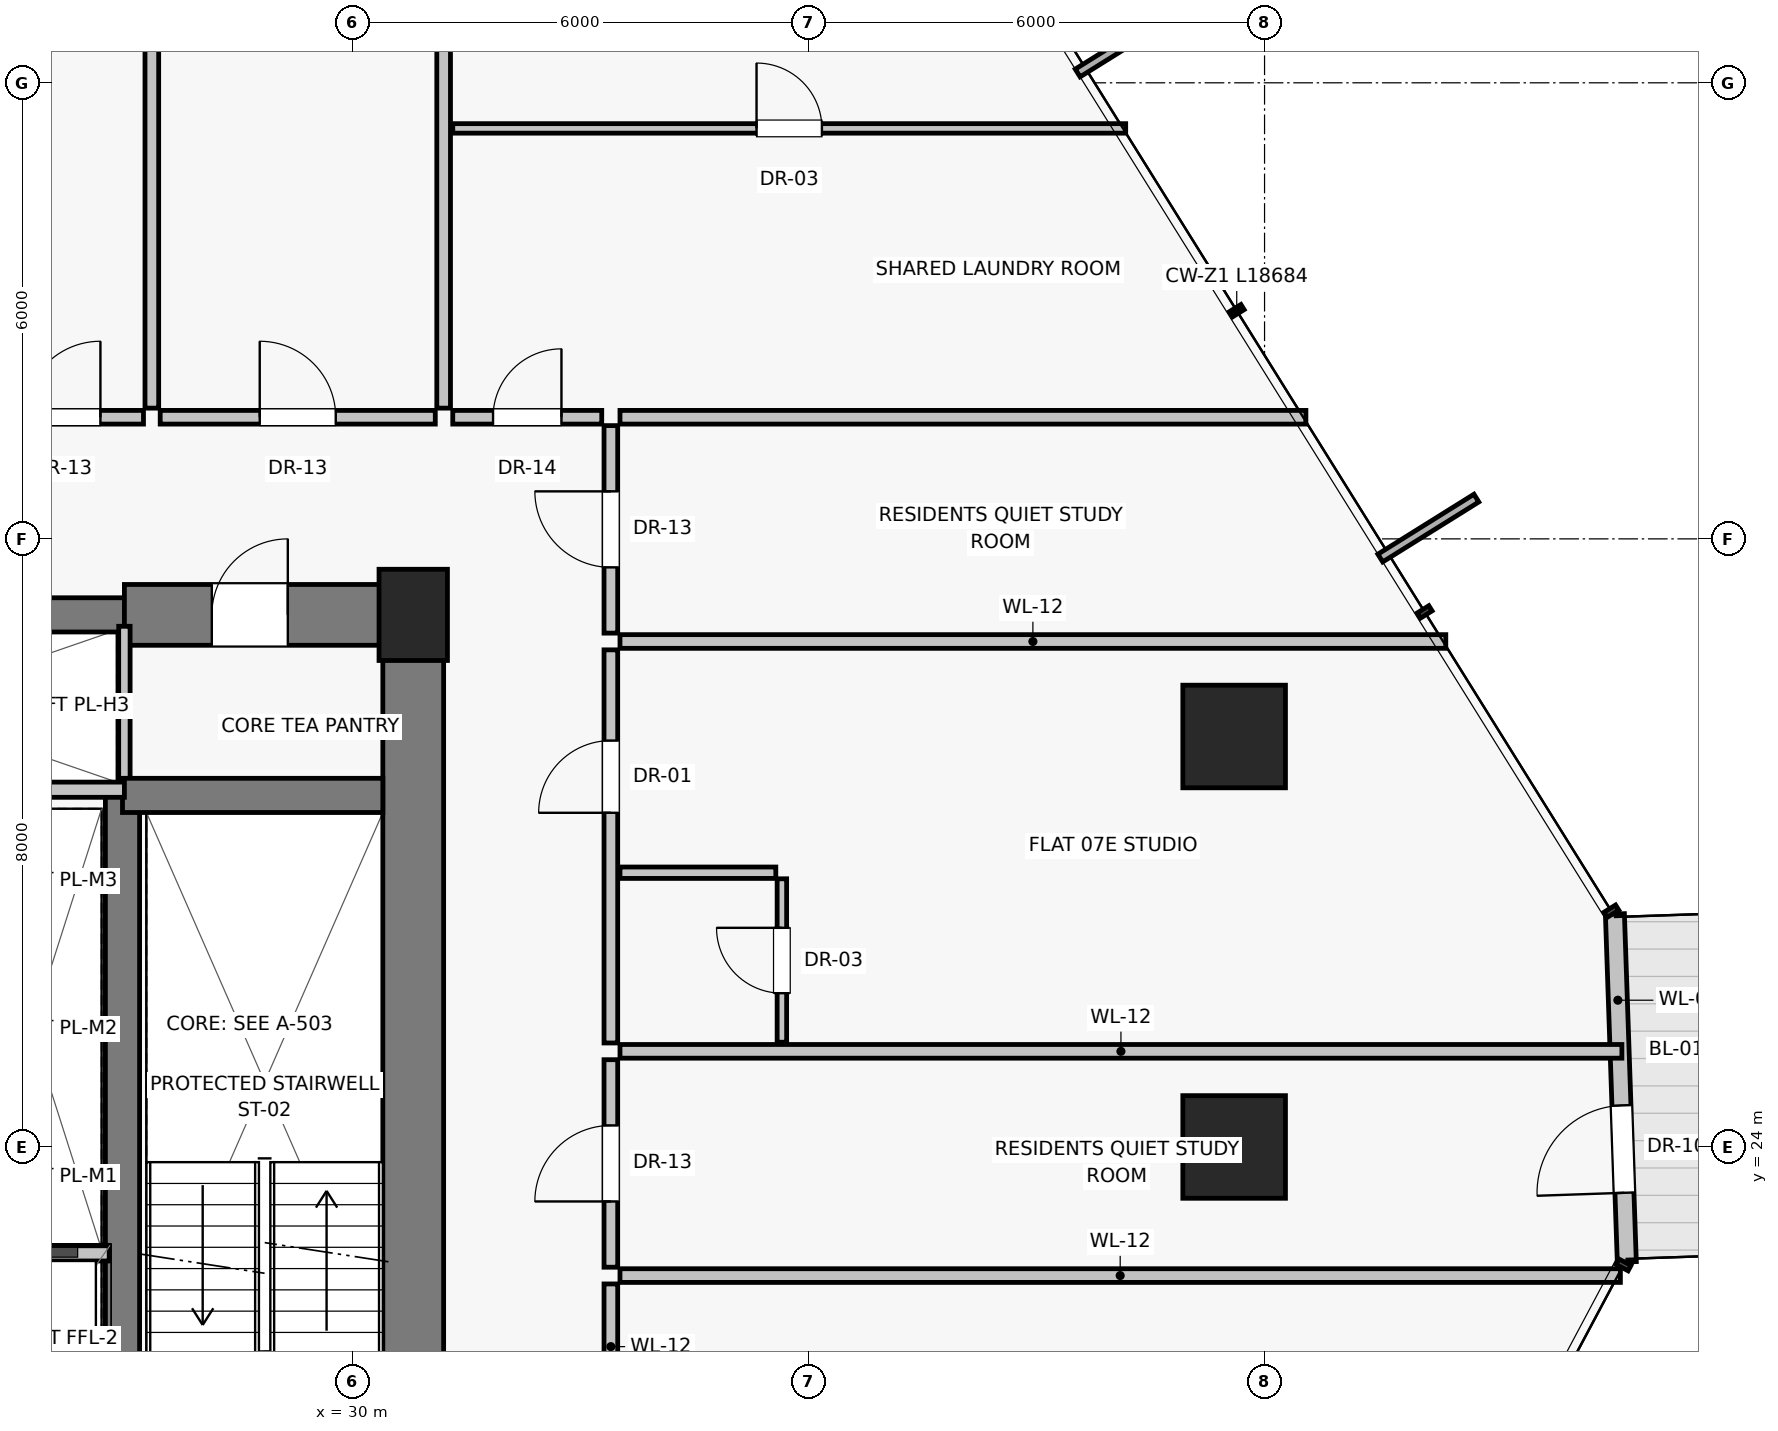
"""IFC4 building model, lengths in metres.
Left out: names, types, materials, properties, quantities, classifications, styles, units other than length and angle.
Written with IfcOpenShell. Run it as: python <this file> out.ifc"""

import sys

from ifc_helpers import new_model, si_unit, direction, frame, frame_2d, origin, origin_2d, place, context, subcontext, project, spatial, rectangle, extrude, source, transform, mapped, element, fill, save


model = new_model("IFC4")
c1 = context("Model", 3, precision=1e-05, world=origin(), true_north=direction((0.0, 1.0)))
c2 = subcontext(c1, "Body", "Model", "MODEL_VIEW")
j1 = project(units=[si_unit("LENGTHUNIT", "METRE"), si_unit("PLANEANGLEUNIT", "RADIAN")], contexts=[c1])
p1 = place(None, origin())
s1 = spatial("IfcSite", under=j1, at=p1, CompositionType="ELEMENT")
p2 = place(p1, origin())
s2 = spatial("IfcBuilding", under=s1, at=p2, CompositionType="ELEMENT")
p3 = place(p2, frame((0.0, 0.0, 30.55)))
s3 = spatial("IfcBuildingStorey", under=s2, at=p3, CompositionType="ELEMENT", Elevation=30.55)
p4 = place(p3, frame((30.8, 31.0, 0.0), z_axis=(0.0, 0.0, 1.0), x_axis=(1.0, 0.0, 0.0)))
e1 = element("IfcColumn", 1, at=p4, inside=s3, PredefinedType="PILASTER", context=c2, shape_type="SweptSolid", body=[
    extrude(rectangle(XDim=0.9, YDim=1.2, at=origin_2d()), origin(), (0.0, 0.0, 1.0), 3.25),
])
for number, where, z_axis, x_axis in (
    (2, (41.6, 24.0, 0.0), (0.0, 0.0, 1.0), (1.0, 0.0, 0.0)),
    (3, (41.6, 29.4, 0.0), (0.0, 0.0, 1.0), (1.0, 0.0, 0.0)),
):
    element("IfcColumn", number, at=place(p3, frame(where, z_axis=z_axis, x_axis=x_axis)), inside=s3, PredefinedType="COLUMN", context=c2, shape_type="SweptSolid", body=[
        extrude(rectangle(XDim=1.35, YDim=1.35, at=origin_2d()), origin(), (0.0, 0.0, 1.0), 3.25),
    ])
p5 = place(p3, frame((46.766, 22.488, 0.0), z_axis=(0.0, 0.0, 1.0), x_axis=(-0.03422176955, 0.999414263701, 0.0)))
e4 = element("IfcWall", 4, at=p5, inside=s3, PredefinedType="SOLIDWALL", context=c2, shape_type="SweptSolid", body=[
    extrude(rectangle(XDim=4.58, YDim=0.25, at=frame_2d((2.29, 0.0))), origin(), (0.0, 0.0, 1.0), 3.0),
])
p6 = place(p5, frame((0.91, 0.0, 0.0)))
e5 = element("IfcOpeningElement", 5, at=p6, cuts=e4, PredefinedType="OPENING", context=c2, shape_type="SweptSolid", body=[
    extrude(rectangle(XDim=1.15, YDim=2.25, at=frame_2d((0.575, 1.125))), frame((0.0, 0.135, 0.0), z_axis=(0.0, -1.0, 0.0), x_axis=(1.0, 0.0, 0.0)), (0.0, 0.0, 1.0), 0.27),
])
p7 = place(p3, frame((30.8, 16.8, 0.0), z_axis=(0.0, 0.0, 1.0), x_axis=(0.0, 1.0, 0.0)))
e6 = element("IfcWall", 6, at=p7, inside=s3, PredefinedType="SHEAR", context=c2, shape_type="SweptSolid", body=[
    extrude(rectangle(XDim=14.2, YDim=0.8, at=frame_2d((7.1, 0.0))), origin(), (0.0, 0.0, 1.0), 3.0),
])
p8 = place(p3, frame((21.0, 31.0, 0.0), z_axis=(0.0, 0.0, 1.0), x_axis=(1.0, 0.0, 0.0)))
e7 = element("IfcWall", 7, at=p8, inside=s3, PredefinedType="SHEAR", context=c2, shape_type="SweptSolid", body=[
    extrude(rectangle(XDim=6.0, YDim=0.45, at=frame_2d((3.0, 0.0))), origin(), (0.0, 0.0, 1.0), 3.0),
])
p9 = place(p3, frame((27.0, 31.0, 0.0), z_axis=(0.0, 0.0, 1.0), x_axis=(1.0, 0.0, 0.0)))
e8 = element("IfcWall", 8, at=p9, inside=s3, PredefinedType="SHEAR", context=c2, shape_type="SweptSolid", body=[
    extrude(rectangle(XDim=3.8, YDim=0.8, at=frame_2d((1.9, 0.0))), origin(), (0.0, 0.0, 1.0), 3.0),
])
p10 = place(p9, frame((1.15, 0.0, 0.0)))
e9 = element("IfcOpeningElement", 9, at=p10, cuts=e8, PredefinedType="OPENING", context=c2, shape_type="SweptSolid", body=[
    extrude(rectangle(XDim=1.0, YDim=2.01, at=frame_2d((0.5, 1.005))), frame((0.0, 0.41, 0.0), z_axis=(0.0, -1.0, 0.0), x_axis=(1.0, 0.0, 0.0)), (0.0, 0.0, 1.0), 0.82),
])
p11 = place(p3, frame((27.0, 28.65, 0.0), z_axis=(0.0, 0.0, 1.0), x_axis=(0.0, 1.0, 0.0)))
e10 = element("IfcWall", 10, at=p11, inside=s3, PredefinedType="PARTITIONING", context=c2, shape_type="SweptSolid", body=[
    extrude(rectangle(XDim=2.2, YDim=0.15, at=frame_2d((1.1, 0.0))), origin(), (0.0, 0.0, 1.0), 3.0),
])
p12 = place(p3, frame((26.975, 19.8, 0.0), z_axis=(0.0, 0.0, 1.0), x_axis=(0.0, 1.0, 0.0)))
e11 = element("IfcWall", 11, at=p12, inside=s3, PredefinedType="SHEAR", context=c2, shape_type="SweptSolid", body=[
    extrude(rectangle(XDim=8.825, YDim=0.45, at=frame_2d((4.413, 0.0))), origin(), (0.0, 0.0, 1.0), 3.0),
])
p13 = place(p3, frame((26.975, 28.625, 0.0), z_axis=(0.0, 0.0, 1.0), x_axis=(1.0, 0.0, 0.0)))
e12 = element("IfcWall", 12, at=p13, inside=s3, PredefinedType="SHEAR", context=c2, shape_type="SweptSolid", body=[
    extrude(rectangle(XDim=3.425, YDim=0.45, at=frame_2d((1.712, 0.0))), origin(), (0.0, 0.0, 1.0), 3.0),
])
p14 = place(p3, frame((24.85, 22.6, 0.0), z_axis=(0.0, 0.0, 1.0), x_axis=(1.0, 0.0, 0.0)))
e13 = element("IfcWall", 13, at=p14, inside=s3, PredefinedType="SOLIDWALL", context=c2, shape_type="SweptSolid", body=[
    extrude(rectangle(XDim=1.95, YDim=0.2, at=frame_2d((0.975, 0.0))), origin(), (0.0, 0.0, 1.0), 3.0),
])
p15 = place(p3, frame((21.0, 28.7, 0.0), z_axis=(0.0, 0.0, 1.0), x_axis=(1.0, 0.0, 0.0)))
e14 = element("IfcWall", 14, at=p15, inside=s3, PredefinedType="SOLIDWALL", context=c2, shape_type="SweptSolid", body=[
    extrude(rectangle(XDim=6.0, YDim=0.2, at=frame_2d((3.0, 0.0))), origin(), (0.0, 0.0, 1.0), 3.0),
])
p16 = place(p3, frame((31.2, 33.72, 0.0), z_axis=(0.0, 0.0, 1.0), x_axis=(0.0, 1.0, 0.0)))
e15 = element("IfcWall", 15, at=p16, inside=s3, PredefinedType="PARTITIONING", context=c2, shape_type="SweptSolid", body=[
    extrude(rectangle(XDim=11.353, YDim=0.18, at=frame_2d((5.677, 0.0))), origin(), (0.0, 0.0, 1.0), 3.0),
])
p17 = place(p3, frame((25.118, 33.6, 0.0), z_axis=(0.0, 0.0, 1.0), x_axis=(1.0, 0.0, 0.0)))
e16 = element("IfcWall", 16, at=p17, inside=s3, PredefinedType="PARTITIONING", context=c2, shape_type="SweptSolid", body=[
    extrude(rectangle(XDim=2.133, YDim=0.18, at=frame_2d((1.066, 0.0))), origin(), (0.0, 0.0, 1.0), 3.0),
])
p18 = place(p17, frame((0.566, 0.0, 0.0)))
e17 = element("IfcOpeningElement", 17, at=p18, cuts=e16, PredefinedType="OPENING", context=c2, shape_type="SweptSolid", body=[
    extrude(rectangle(XDim=1.0, YDim=2.01, at=frame_2d((0.5, 1.005))), frame((0.0, 0.1, 0.0), z_axis=(0.0, -1.0, 0.0), x_axis=(1.0, 0.0, 0.0)), (0.0, 0.0, 1.0), 0.2),
])
p19 = place(p3, frame((27.471, 33.6, 0.0), z_axis=(0.0, 0.0, 1.0), x_axis=(1.0, 0.0, 0.0)))
e18 = element("IfcWall", 18, at=p19, inside=s3, PredefinedType="PARTITIONING", context=c2, shape_type="SweptSolid", body=[
    extrude(rectangle(XDim=3.619, YDim=0.18, at=frame_2d((1.81, 0.0))), origin(), (0.0, 0.0, 1.0), 3.0),
])
p20 = place(p19, frame((1.31, 0.0, 0.0)))
e19 = element("IfcOpeningElement", 19, at=p20, cuts=e18, PredefinedType="OPENING", context=c2, shape_type="SweptSolid", body=[
    extrude(rectangle(XDim=1.0, YDim=2.01, at=frame_2d((0.5, 1.005))), frame((0.0, 0.1, 0.0), z_axis=(0.0, -1.0, 0.0), x_axis=(1.0, 0.0, 0.0)), (0.0, 0.0, 1.0), 0.2),
])
p21 = place(p3, frame((27.361, 33.72, 0.0), z_axis=(0.0, 0.0, 1.0), x_axis=(0.0, 1.0, 0.0)))
e20 = element("IfcWall", 20, at=p21, inside=s3, PredefinedType="PARTITIONING", context=c2, shape_type="SweptSolid", body=[
    extrude(rectangle(XDim=11.222, YDim=0.18, at=frame_2d((5.611, 0.0))), origin(), (0.0, 0.0, 1.0), 3.0),
])
p22 = place(p3, frame((33.52, 33.6, 0.0), z_axis=(0.0, 0.0, 1.0), x_axis=(1.0, 0.0, 0.0)))
e21 = element("IfcWall", 21, at=p22, inside=s3, PredefinedType="PARTITIONING", context=c2, shape_type="SweptSolid", body=[
    extrude(rectangle(XDim=9.024, YDim=0.18, at=frame_2d((4.512, 0.0))), origin(), (0.0, 0.0, 1.0), 3.0),
])
p23 = place(p3, frame((33.4, 22.418, 0.0), z_axis=(0.0, 0.0, 1.0), x_axis=(0.0, 1.0, 0.0)))
e22 = element("IfcWall", 22, at=p23, inside=s3, PredefinedType="PARTITIONING", context=c2, shape_type="SweptSolid", body=[
    extrude(rectangle(XDim=2.73, YDim=0.18, at=frame_2d((1.365, 0.0))), origin(), (0.0, 0.0, 1.0), 3.0),
])
p24 = place(p23, frame((0.865, 0.0, 0.0)))
e23 = element("IfcOpeningElement", 23, at=p24, cuts=e22, PredefinedType="OPENING", context=c2, shape_type="SweptSolid", body=[
    extrude(rectangle(XDim=1.0, YDim=2.01, at=frame_2d((0.5, 1.005))), frame((0.0, 0.1, 0.0), z_axis=(0.0, -1.0, 0.0), x_axis=(1.0, 0.0, 0.0)), (0.0, 0.0, 1.0), 0.2),
])
p25 = place(p3, frame((33.52, 22.308, 0.0), z_axis=(0.0, 0.0, 1.0), x_axis=(1.0, 0.0, 0.0)))
e24 = element("IfcWall", 24, at=p25, inside=s3, PredefinedType="PARTITIONING", context=c2, shape_type="SweptSolid", body=[
    extrude(rectangle(XDim=13.162, YDim=0.18, at=frame_2d((6.581, 0.0))), origin(), (0.0, 0.0, 1.0), 3.0),
])
p26 = place(p3, frame((33.4, 14.31, 0.0), z_axis=(0.0, 0.0, 1.0), x_axis=(0.0, 1.0, 0.0)))
e25 = element("IfcWall", 25, at=p26, inside=s3, PredefinedType="PARTITIONING", context=c2, shape_type="SweptSolid", body=[
    extrude(rectangle(XDim=7.888, YDim=0.18, at=frame_2d((3.944, 0.0))), origin(), (0.0, 0.0, 1.0), 3.0),
])
p27 = place(p26, frame((5.038, 0.0, 0.0)))
e26 = element("IfcOpeningElement", 26, at=p27, cuts=e25, PredefinedType="OPENING", context=c2, shape_type="SweptSolid", body=[
    extrude(rectangle(XDim=0.95, YDim=2.02, at=frame_2d((0.475, 1.01))), frame((0.0, 0.1, 0.0), z_axis=(0.0, -1.0, 0.0), x_axis=(1.0, 0.0, 0.0)), (0.0, 0.0, 1.0), 0.2),
])
p28 = place(p3, frame((33.52, 25.258, 0.0), z_axis=(0.0, 0.0, 1.0), x_axis=(1.0, 0.0, 0.0)))
e27 = element("IfcWall", 27, at=p28, inside=s3, PredefinedType="PARTITIONING", context=c2, shape_type="SweptSolid", body=[
    extrude(rectangle(XDim=13.181, YDim=0.18, at=frame_2d((6.591, 0.0))), origin(), (0.0, 0.0, 1.0), 3.0),
])
p29 = place(p3, frame((33.4, 30.76, 0.0), z_axis=(0.0, 0.0, 1.0), x_axis=(0.0, 1.0, 0.0)))
e28 = element("IfcWall", 28, at=p29, inside=s3, PredefinedType="PARTITIONING", context=c2, shape_type="SweptSolid", body=[
    extrude(rectangle(XDim=2.73, YDim=0.18, at=frame_2d((1.365, 0.0))), origin(), (0.0, 0.0, 1.0), 3.0),
])
p30 = place(p29, frame((0.865, 0.0, 0.0)))
e29 = element("IfcOpeningElement", 29, at=p30, cuts=e28, PredefinedType="OPENING", context=c2, shape_type="SweptSolid", body=[
    extrude(rectangle(XDim=1.0, YDim=2.01, at=frame_2d((0.5, 1.005))), frame((0.0, 0.1, 0.0), z_axis=(0.0, -1.0, 0.0), x_axis=(1.0, 0.0, 0.0)), (0.0, 0.0, 1.0), 0.2),
])
p31 = place(p3, frame((33.52, 30.65, 0.0), z_axis=(0.0, 0.0, 1.0), x_axis=(1.0, 0.0, 0.0)))
e30 = element("IfcWall", 30, at=p31, inside=s3, PredefinedType="PARTITIONING", context=c2, shape_type="SweptSolid", body=[
    extrude(rectangle(XDim=10.865, YDim=0.18, at=frame_2d((5.432, 0.0))), origin(), (0.0, 0.0, 1.0), 2.299),
])
p32 = place(p3, frame((33.4, 25.368, 0.0), z_axis=(0.0, 0.0, 1.0), x_axis=(0.0, 1.0, 0.0)))
e31 = element("IfcWall", 31, at=p32, inside=s3, PredefinedType="PARTITIONING", context=c2, shape_type="SweptSolid", body=[
    extrude(rectangle(XDim=5.172, YDim=0.18, at=frame_2d((2.586, 0.0))), origin(), (0.0, 0.0, 1.0), 3.0),
])
p33 = place(p32, frame((3.028, 0.0, 0.0)))
e32 = element("IfcOpeningElement", 32, at=p33, cuts=e31, PredefinedType="OPENING", context=c2, shape_type="SweptSolid", body=[
    extrude(rectangle(XDim=0.95, YDim=2.02, at=frame_2d((0.475, 1.01))), frame((0.0, 0.1, 0.0), z_axis=(0.0, -1.0, 0.0), x_axis=(1.0, 0.0, 0.0)), (0.0, 0.0, 1.0), 0.2),
])
p34 = place(p3, frame((33.52, 27.608, 0.0), z_axis=(0.0, 0.0, 1.0), x_axis=(1.0, 0.0, 0.0)))
e33 = element("IfcWall", 33, at=p34, inside=s3, PredefinedType="PARTITIONING", context=c2, shape_type="SweptSolid", body=[
    extrude(rectangle(XDim=2.05, YDim=0.15, at=frame_2d((1.025, 0.0))), origin(), (0.0, 0.0, 1.0), 3.0),
])
p35 = place(p3, frame((35.65, 25.378, 0.0), z_axis=(0.0, 0.0, 1.0), x_axis=(0.0, 1.0, 0.0)))
e34 = element("IfcWall", 34, at=p35, inside=s3, PredefinedType="PARTITIONING", context=c2, shape_type="SweptSolid", body=[
    extrude(rectangle(XDim=2.15, YDim=0.125, at=frame_2d((1.075, 0.0))), origin(), (0.0, 0.0, 1.0), 3.0),
])
p36 = place(p35, frame((0.645, 0.0, 0.0)))
e35 = element("IfcOpeningElement", 35, at=p36, cuts=e34, PredefinedType="OPENING", context=c2, shape_type="SweptSolid", body=[
    extrude(rectangle(XDim=0.86, YDim=2.01, at=frame_2d((0.43, 1.005))), frame((0.0, 0.073, 0.0), z_axis=(0.0, -1.0, 0.0), x_axis=(1.0, 0.0, 0.0)), (0.0, 0.0, 1.0), 0.145),
])
p37 = place(p3, frame((31.32, 33.6, 0.0), z_axis=(0.0, 0.0, 1.0), x_axis=(1.0, 0.0, 0.0)))
e36 = element("IfcWall", 36, at=p37, inside=s3, PredefinedType="PARTITIONING", context=c2, shape_type="SweptSolid", body=[
    extrude(rectangle(XDim=1.96, YDim=0.18, at=frame_2d((0.98, 0.0))), origin(), (0.0, 0.0, 1.0), 3.0),
])
p38 = place(p37, frame((0.53, 0.0, 0.0)))
e37 = element("IfcOpeningElement", 37, at=p38, cuts=e36, PredefinedType="OPENING", context=c2, shape_type="SweptSolid", body=[
    extrude(rectangle(XDim=0.9, YDim=2.01, at=frame_2d((0.45, 1.005))), frame((0.0, 0.1, 0.0), z_axis=(0.0, -1.0, 0.0), x_axis=(1.0, 0.0, 0.0)), (0.0, 0.0, 1.0), 0.2),
])
p39 = place(p3, frame((31.32, 37.4, 0.0), z_axis=(0.0, 0.0, 1.0), x_axis=(1.0, 0.0, 0.0)))
e38 = element("IfcWall", 38, at=p39, inside=s3, PredefinedType="PARTITIONING", context=c2, shape_type="SweptSolid", body=[
    extrude(rectangle(XDim=8.853, YDim=0.125, at=frame_2d((4.427, 0.0))), origin(), (0.0, 0.0, 1.0), 3.0),
])
p40 = place(p39, frame((3.997, 0.0, 0.0)))
e39 = element("IfcOpeningElement", 39, at=p40, cuts=e38, PredefinedType="OPENING", context=c2, shape_type="SweptSolid", body=[
    extrude(rectangle(XDim=0.86, YDim=2.01, at=frame_2d((0.43, 1.005))), frame((0.0, 0.073, 0.0), z_axis=(0.0, -1.0, 0.0), x_axis=(1.0, 0.0, 0.0)), (0.0, 0.0, 1.0), 0.145),
])
m1 = source(origin(), c2, "Body", "SweptSolid", [
    extrude(rectangle(XDim=1.15, YDim=2.25, at=frame_2d((0.575, 1.125))), frame((0.0, 0.025, 0.0), z_axis=(0.0, -1.0, 0.0), x_axis=(1.0, 0.0, 0.0)), (0.0, 0.0, 1.0), 0.05),
])
p41 = place(p6, frame((1.15, 0.0, 0.0), z_axis=(0.0, 0.0, 1.0), x_axis=(-1.0, 0.0, 0.0)))
e40 = element("IfcDoor", 40, at=p41, inside=s3, OperationType="SINGLE_SWING_LEFT", PredefinedType="DOOR", context=c2, shape_type="MappedRepresentation", body=[
    mapped(m1, transform((0.0, 0.0, 0.0), scale=1.0)),
])
fill(e5, e40)
m2 = source(origin(), c2, "Body", "SweptSolid", [
    extrude(rectangle(XDim=1.0, YDim=2.01, at=frame_2d((0.5, 1.005))), frame((0.0, 0.025, 0.0), z_axis=(0.0, -1.0, 0.0), x_axis=(1.0, 0.0, 0.0)), (0.0, 0.0, 1.0), 0.05),
])
p42 = place(p10, origin())
e41 = element("IfcDoor", 41, at=p42, inside=s3, OperationType="SINGLE_SWING_RIGHT", PredefinedType="DOOR", context=c2, shape_type="MappedRepresentation", body=[
    mapped(m2, transform((0.0, 0.0, 0.0), scale=1.0)),
])
fill(e9, e41)
p43 = place(p18, origin())
e42 = element("IfcDoor", 42, at=p43, inside=s3, OperationType="SINGLE_SWING_RIGHT", PredefinedType="DOOR", context=c2, shape_type="MappedRepresentation", body=[
    mapped(m2, transform((0.0, 0.0, 0.0), scale=1.0)),
])
fill(e17, e42)
p44 = place(p20, origin())
e43 = element("IfcDoor", 43, at=p44, inside=s3, OperationType="SINGLE_SWING_LEFT", PredefinedType="DOOR", context=c2, shape_type="MappedRepresentation", body=[
    mapped(m2, transform((0.0, 0.0, 0.0), scale=1.0)),
])
fill(e19, e43)
p45 = place(p24, origin())
e44 = element("IfcDoor", 44, at=p45, inside=s3, OperationType="SINGLE_SWING_LEFT", PredefinedType="DOOR", context=c2, shape_type="MappedRepresentation", body=[
    mapped(m2, transform((0.0, 0.0, 0.0), scale=1.0)),
])
fill(e23, e44)
p46 = place(p30, origin())
e45 = element("IfcDoor", 45, at=p46, inside=s3, OperationType="SINGLE_SWING_RIGHT", PredefinedType="DOOR", context=c2, shape_type="MappedRepresentation", body=[
    mapped(m2, transform((0.0, 0.0, 0.0), scale=1.0)),
])
fill(e29, e45)
m3 = source(origin(), c2, "Body", "SweptSolid", [
    extrude(rectangle(XDim=0.95, YDim=2.02, at=frame_2d((0.475, 1.01))), frame((0.0, 0.025, 0.0), z_axis=(0.0, -1.0, 0.0), x_axis=(1.0, 0.0, 0.0)), (0.0, 0.0, 1.0), 0.05),
])
p47 = place(p33, origin())
e46 = element("IfcDoor", 46, at=p47, inside=s3, OperationType="SINGLE_SWING_LEFT", PredefinedType="DOOR", context=c2, shape_type="MappedRepresentation", body=[
    mapped(m3, transform((0.0, 0.0, 0.0), scale=1.0)),
])
fill(e32, e46)
m4 = source(origin(), c2, "Body", "SweptSolid", [
    extrude(rectangle(XDim=0.86, YDim=2.01, at=frame_2d((0.43, 1.005))), frame((0.0, 0.025, 0.0), z_axis=(0.0, -1.0, 0.0), x_axis=(1.0, 0.0, 0.0)), (0.0, 0.0, 1.0), 0.05),
])
p48 = place(p36, origin())
e47 = element("IfcDoor", 47, at=p48, inside=s3, OperationType="SINGLE_SWING_RIGHT", PredefinedType="DOOR", context=c2, shape_type="MappedRepresentation", body=[
    mapped(m4, transform((0.0, 0.0, 0.0), scale=1.0)),
])
fill(e35, e47)
m5 = source(origin(), c2, "Body", "SweptSolid", [
    extrude(rectangle(XDim=0.9, YDim=2.01, at=frame_2d((0.45, 1.005))), frame((0.0, 0.025, 0.0), z_axis=(0.0, -1.0, 0.0), x_axis=(1.0, 0.0, 0.0)), (0.0, 0.0, 1.0), 0.05),
])
p49 = place(p38, origin())
e48 = element("IfcDoor", 48, at=p49, inside=s3, OperationType="SINGLE_SWING_RIGHT", PredefinedType="DOOR", context=c2, shape_type="MappedRepresentation", body=[
    mapped(m5, transform((0.0, 0.0, 0.0), scale=1.0)),
])
fill(e37, e48)
p50 = place(p40, origin())
e49 = element("IfcDoor", 49, at=p50, inside=s3, OperationType="SINGLE_SWING_LEFT", PredefinedType="DOOR", context=c2, shape_type="MappedRepresentation", body=[
    mapped(m4, transform((0.0, 0.0, 0.0), scale=1.0)),
])
fill(e39, e49)
save(model, sys.argv[1])
